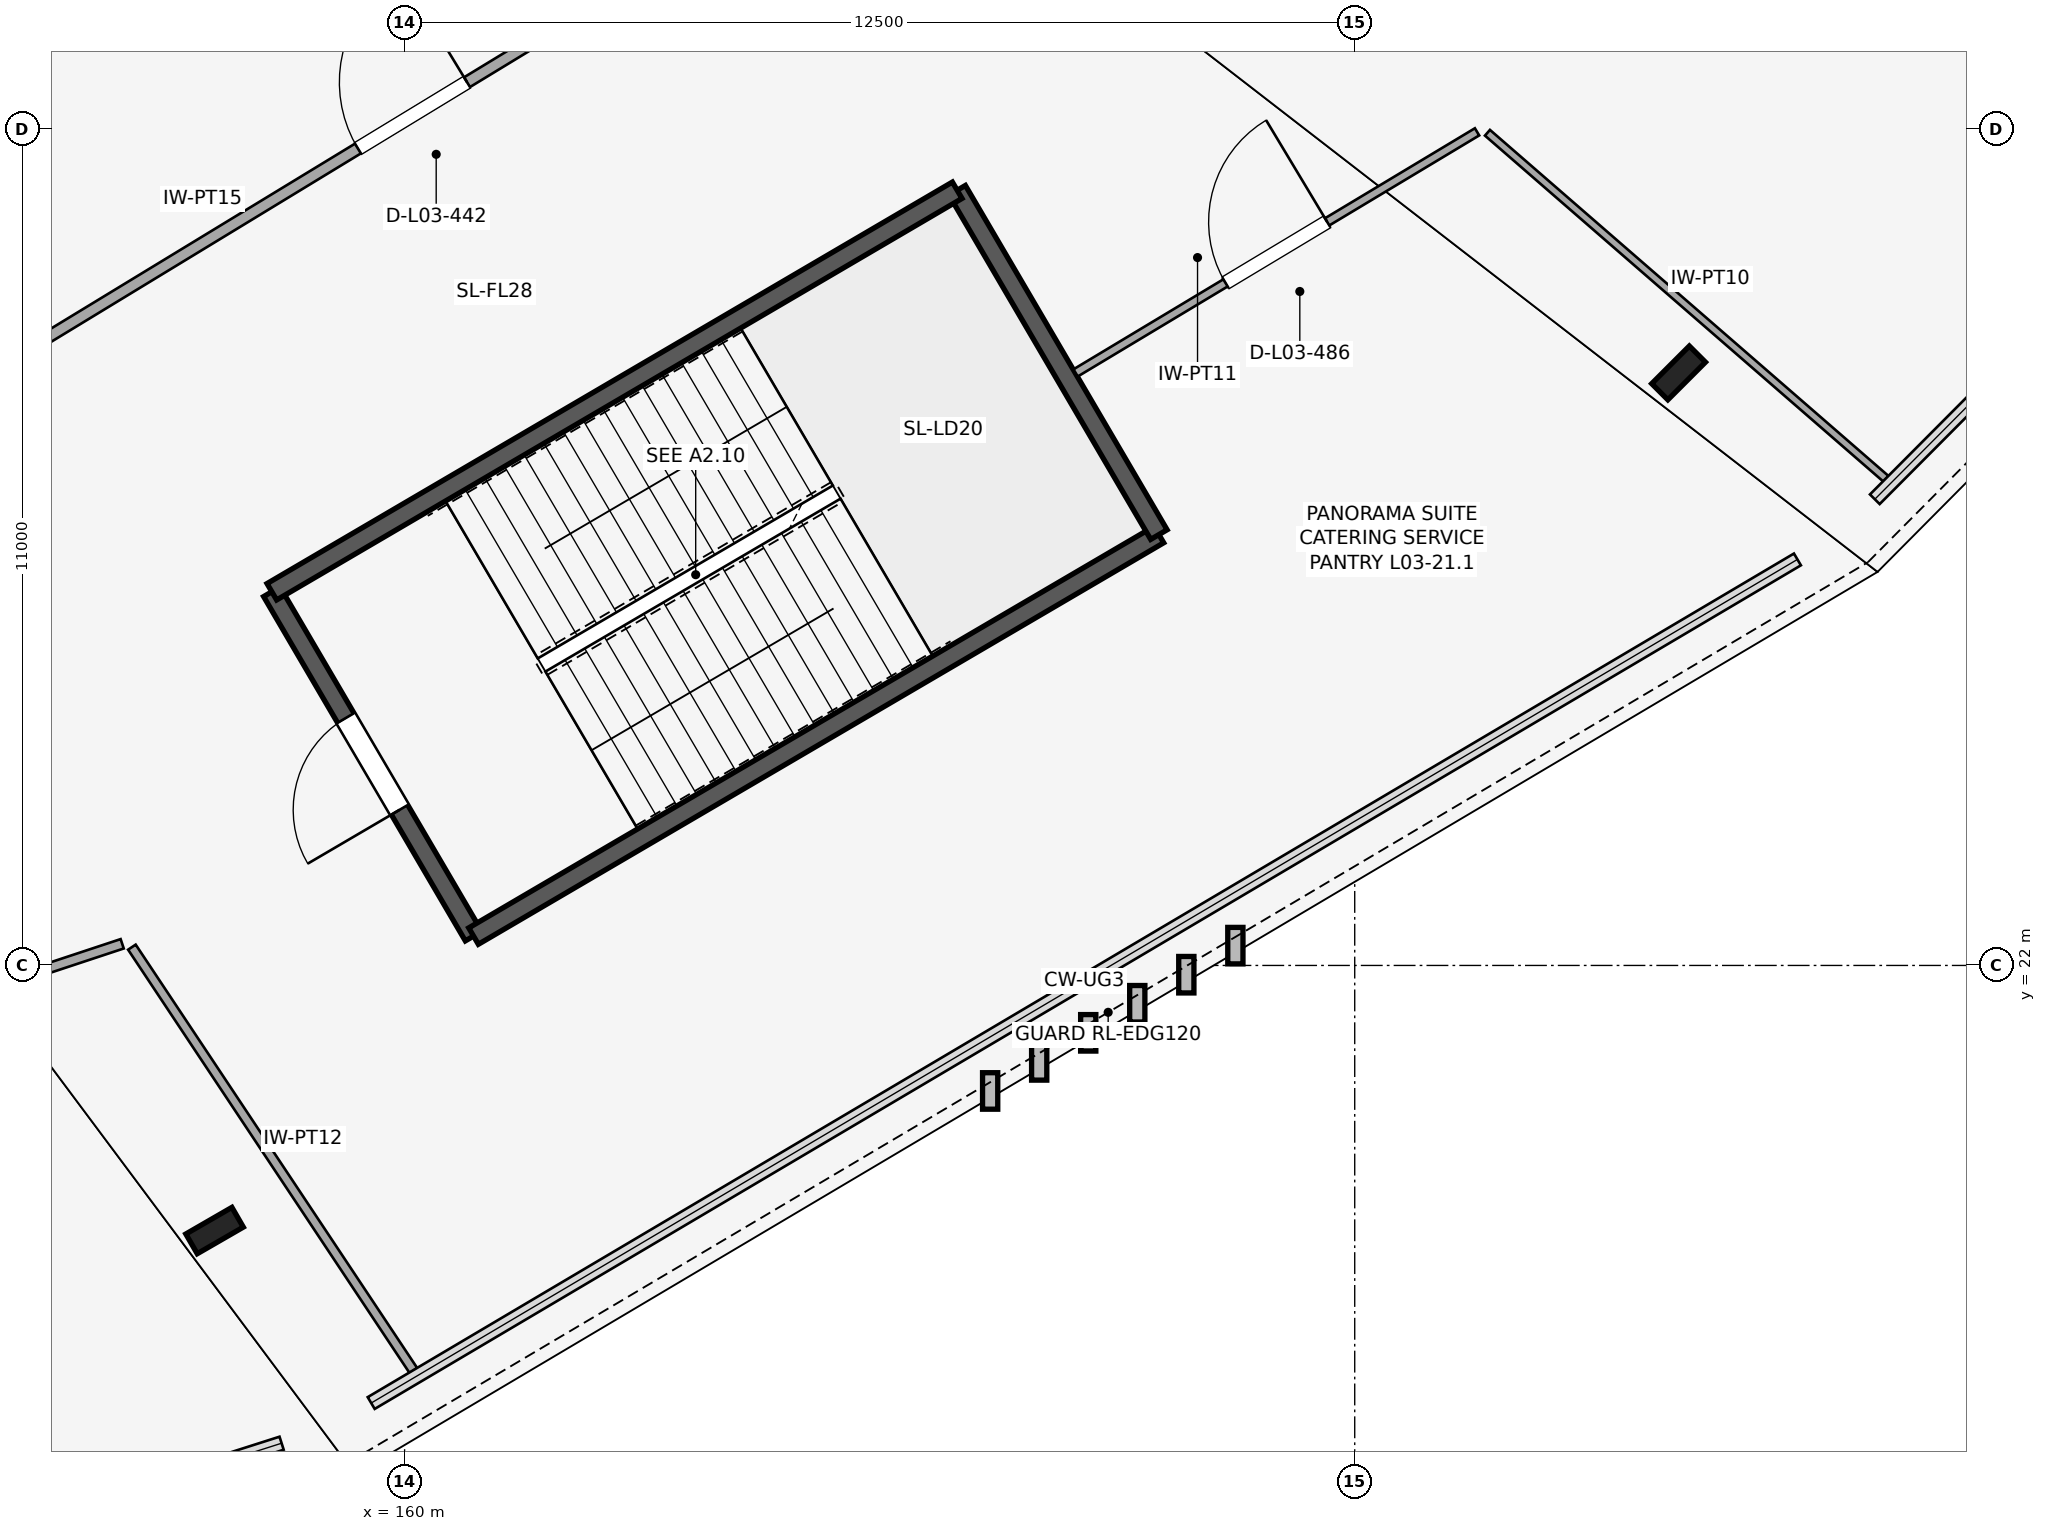
"""IFC4 building model, lengths in metres.
Left out: names, types, materials, properties, quantities, classifications, styles, units other than length and angle.
Written with IfcOpenShell. Run it as: python <this file> out.ifc"""

import sys

from ifc_helpers import new_model, si_unit, direction, frame, frame_2d, origin, origin_2d, place, context, subcontext, project, spatial, rectangle, i_section, extrude, element, fill, save


model = new_model("IFC4")
c1 = context("Model", 3, precision=1e-05, world=origin(), true_north=direction((0.0, 1.0)))
c2 = subcontext(c1, "Body", "Model", "MODEL_VIEW")
j1 = project(units=[si_unit("LENGTHUNIT", "METRE"), si_unit("PLANEANGLEUNIT", "RADIAN")], contexts=[c1])
p1 = place(None, origin())
s1 = spatial("IfcSite", under=j1, at=p1, CompositionType="ELEMENT")
p2 = place(p1, origin())
s2 = spatial("IfcBuilding", under=s1, at=p2, CompositionType="ELEMENT")
p3 = place(p2, frame((0.0, 0.0, 15.6)))
s3 = spatial("IfcBuildingStorey", under=s2, at=p3, CompositionType="ELEMENT", Elevation=15.6)
for number, where, z_axis, x_axis in (
    (1, (157.5, 18.512, 0.0), (0.0, 0.0, 1.0), (0.5, -0.866, 0.0)),
    (2, (176.761, 29.795, 0.0), (0.0, 0.0, 1.0), (0.707, -0.707, 0.0)),
):
    element("IfcColumn", number, at=place(p3, frame(where, z_axis=z_axis, x_axis=x_axis)), inside=s3, PredefinedType="COLUMN", context=c2, shape_type="SweptSolid", body=[
        extrude(i_section(OverallWidth=0.3, OverallDepth=0.7, WebThickness=0.017, FlangeThickness=0.032, FilletRadius=0.027, at=origin_2d()), origin(), (0.0, 0.0, 1.0), 5.2),
    ])
p4 = place(p3, frame((158.253, 26.916, 0.0), z_axis=(0.0, 0.0, 1.0), x_axis=(0.505460490551, -0.862849750821, 0.0)))
e3 = element("IfcWall", 3, at=p4, inside=s3, PredefinedType="SHEAR", context=c2, shape_type="SweptSolid", body=[
    extrude(rectangle(XDim=5.25, YDim=0.25, at=frame_2d((2.625, 0.0))), origin(), (0.0, 0.0, 1.0), 4.9),
])
p5 = place(p4, frame((1.925, 0.0, 0.0)))
e4 = element("IfcOpeningElement", 4, at=p5, cuts=e3, PredefinedType="OPENING", context=c2, shape_type="SweptSolid", body=[
    extrude(rectangle(XDim=1.4, YDim=2.2, at=frame_2d((0.7, 1.1))), frame((0.0, 0.135, 0.0), z_axis=(0.0, -1.0, 0.0), x_axis=(1.0, 0.0, 0.0)), (0.0, 0.0, 1.0), 0.27),
])
p6 = place(p3, frame((160.907, 22.386, 0.0), z_axis=(0.0, 0.0, 1.0), x_axis=(0.862854686184, 0.505452065513, 0.0)))
e5 = element("IfcWall", 5, at=p6, inside=s3, PredefinedType="SHEAR", context=c2, shape_type="SweptSolid", body=[
    extrude(rectangle(XDim=10.45, YDim=0.25, at=frame_2d((5.225, 0.0))), origin(), (0.0, 0.0, 1.0), 4.9),
])
p7 = place(p3, frame((169.924, 27.668, 0.0), z_axis=(0.0, 0.0, 1.0), x_axis=(-0.505474830399, 0.862841350327, 0.0)))
e6 = element("IfcWall", 6, at=p7, inside=s3, PredefinedType="SHEAR", context=c2, shape_type="SweptSolid", body=[
    extrude(rectangle(XDim=5.25, YDim=0.25, at=frame_2d((2.625, 0.0))), origin(), (0.0, 0.0, 1.0), 4.9),
])
p8 = place(p3, frame((167.27, 32.198, 0.0), z_axis=(0.0, 0.0, 1.0), x_axis=(-0.862838527648, -0.505479648657, 0.0)))
e7 = element("IfcWall", 7, at=p8, inside=s3, PredefinedType="SHEAR", context=c2, shape_type="SweptSolid", body=[
    extrude(rectangle(XDim=10.45, YDim=0.25, at=frame_2d((5.225, 0.0))), origin(), (0.0, 0.0, 1.0), 4.9),
])
p9 = place(p3, frame((151.75, 28.102, 0.0), z_axis=(0.0, 0.0, 1.0), x_axis=(0.854342934422, 0.519709678959, 0.0)))
e8 = element("IfcWall", 8, at=p9, inside=s3, PredefinedType="PARTITIONING", context=c2, shape_type="SweptSolid", body=[
    extrude(rectangle(XDim=19.555, YDim=0.15, at=frame_2d((9.777, 0.0))), origin(), (0.0, 0.0, 1.0), 2.45),
])
p10 = place(p9, frame((8.938, 0.0, 0.0)))
e9 = element("IfcOpeningElement", 9, at=p10, cuts=e8, PredefinedType="OPENING", context=c2, shape_type="SweptSolid", body=[
    extrude(rectangle(XDim=1.68, YDim=2.1, at=frame_2d((0.84, 1.05))), frame((0.0, 0.085, 0.0), z_axis=(0.0, -1.0, 0.0), x_axis=(1.0, 0.0, 0.0)), (0.0, 0.0, 1.0), 0.17),
])
p11 = place(p3, frame((149.537, 20.051, 0.0), z_axis=(0.0, 0.0, 1.0), x_axis=(0.949337322042, 0.314258888464, 0.0)))
e10 = element("IfcWall", 10, at=p11, inside=s3, PredefinedType="PARTITIONING", context=c2, shape_type="SweptSolid", body=[
    extrude(rectangle(XDim=7.108, YDim=0.13, at=frame_2d((3.554, 0.0))), origin(), (0.0, 0.0, 1.0), 2.45),
])
p12 = place(p11, frame((2.834, 0.0, 0.0)))
e11 = element("IfcOpeningElement", 11, at=p12, cuts=e10, PredefinedType="OPENING", context=c2, shape_type="SweptSolid", body=[
    extrude(rectangle(XDim=1.44, YDim=2.24, at=frame_2d((0.72, 1.12))), frame((0.0, 0.075, 0.0), z_axis=(0.0, -1.0, 0.0), x_axis=(1.0, 0.0, 0.0)), (0.0, 0.0, 1.0), 0.15),
])
p13 = place(p3, frame((156.412, 22.241, 0.0), z_axis=(0.0, 0.0, 1.0), x_axis=(0.55367221868, -0.832734696204, 0.0)))
e12 = element("IfcWall", 12, at=p13, inside=s3, PredefinedType="PARTITIONING", context=c2, shape_type="SweptSolid", body=[
    extrude(rectangle(XDim=6.689, YDim=0.12, at=frame_2d((3.345, 0.0))), origin(), (0.0, 0.0, 1.0), 2.45),
])
p14 = place(p3, frame((168.828, 29.796, 0.0), z_axis=(0.0, 0.0, 1.0), x_axis=(0.857311024585, 0.514798802567, 0.0)))
e13 = element("IfcWall", 13, at=p14, inside=s3, PredefinedType="PARTITIONING", context=c2, shape_type="SweptSolid", body=[
    extrude(rectangle(XDim=6.16, YDim=0.11, at=frame_2d((3.08, 0.0))), origin(), (0.0, 0.0, 1.0), 2.45),
])
p15 = place(p14, frame((2.3, 0.0, 0.0)))
e14 = element("IfcOpeningElement", 14, at=p15, cuts=e13, PredefinedType="OPENING", context=c2, shape_type="SweptSolid", body=[
    extrude(rectangle(XDim=1.56, YDim=2.1, at=frame_2d((0.78, 1.05))), frame((0.0, 0.065, 0.0), z_axis=(0.0, -1.0, 0.0), x_axis=(1.0, 0.0, 0.0)), (0.0, 0.0, 1.0), 0.13),
])
p16 = place(p3, frame((174.246, 32.955, 0.0), z_axis=(0.0, 0.0, 1.0), x_axis=(0.755051896795, -0.655665031206, 0.0)))
e15 = element("IfcWall", 15, at=p16, inside=s3, PredefinedType="PARTITIONING", context=c2, shape_type="SweptSolid", body=[
    extrude(rectangle(XDim=6.944, YDim=0.1, at=frame_2d((3.472, 0.0))), origin(), (0.0, 0.0, 1.0), 2.45),
])
p17 = place(p5, frame((1.4, 0.0, 0.0), z_axis=(0.0, 0.0, 1.0), x_axis=(-1.0, 0.0, 0.0)))
e16 = element("IfcDoor", 16, at=p17, inside=s3, OperationType="SINGLE_SWING_LEFT", PredefinedType="DOOR", context=c2, shape_type="SweptSolid", body=[
    extrude(rectangle(XDim=1.4, YDim=2.2, at=frame_2d((0.7, 1.1))), frame((0.0, 0.025, 0.0), z_axis=(0.0, -1.0, 0.0), x_axis=(1.0, 0.0, 0.0)), (0.0, 0.0, 1.0), 0.05),
])
fill(e4, e16)
p18 = place(p10, origin())
e17 = element("IfcDoor", 17, at=p18, inside=s3, OperationType="SINGLE_SWING_RIGHT", PredefinedType="DOOR", context=c2, shape_type="SweptSolid", body=[
    extrude(rectangle(XDim=1.68, YDim=2.1, at=frame_2d((0.84, 1.05))), frame((0.0, 0.025, 0.0), z_axis=(0.0, -1.0, 0.0), x_axis=(1.0, 0.0, 0.0)), (0.0, 0.0, 1.0), 0.05),
])
fill(e9, e17)
p19 = place(p15, origin())
e18 = element("IfcDoor", 18, at=p19, inside=s3, OperationType="SINGLE_SWING_RIGHT", PredefinedType="DOOR", context=c2, shape_type="SweptSolid", body=[
    extrude(rectangle(XDim=1.56, YDim=2.1, at=frame_2d((0.78, 1.05))), frame((0.0, 0.025, 0.0), z_axis=(0.0, -1.0, 0.0), x_axis=(1.0, 0.0, 0.0)), (0.0, 0.0, 1.0), 0.05),
])
fill(e14, e18)
save(model, sys.argv[1])
